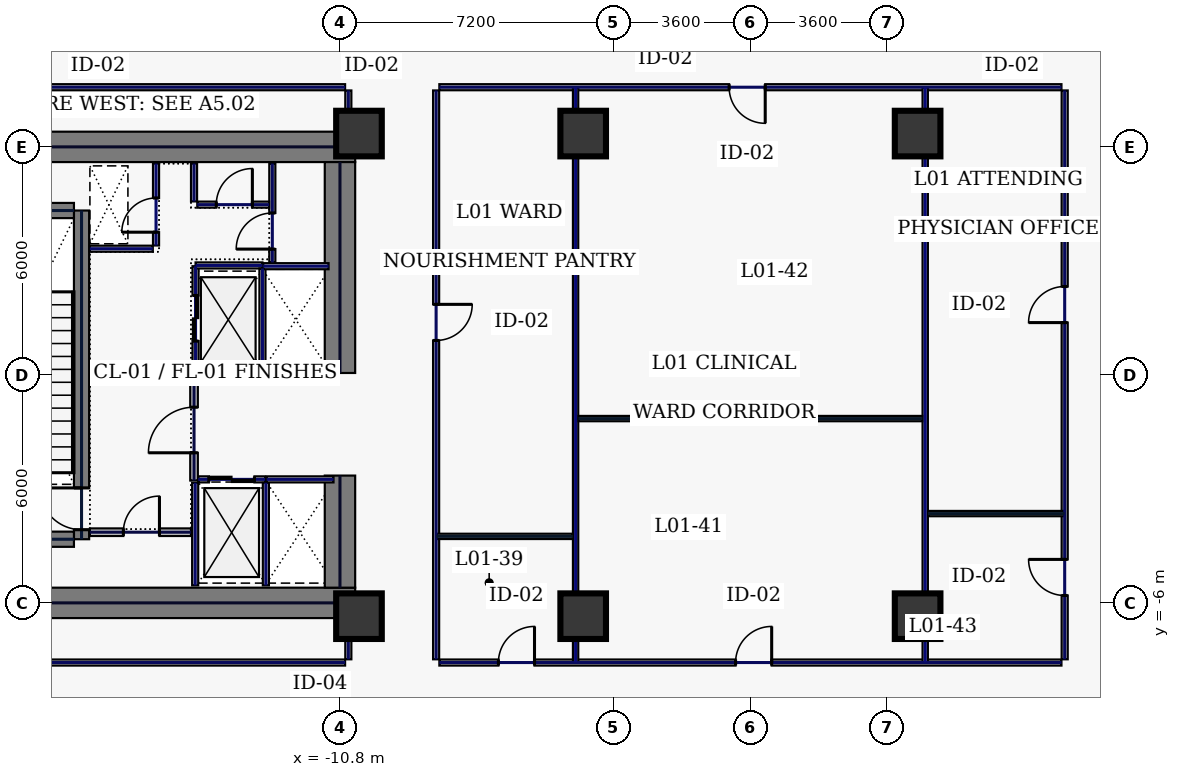
"""IFC4 building model, lengths in metres.
Left out: names, types, materials, properties, quantities, classifications, styles, units other than length and angle.
Written with IfcOpenShell. Run it as: python <this file> out.ifc"""

import sys

from ifc_helpers import new_model, si_unit, direction, frame, frame_2d, origin, origin_2d, place, context, subcontext, project, spatial, rectangle, hollow_rectangle, extrude, element, fill, save


model = new_model("IFC4")
c1 = context("Model", 3, precision=1e-05, world=origin(), true_north=direction((0.0, 1.0)))
c2 = subcontext(c1, "Body", "Model", "MODEL_VIEW")
j1 = project(units=[si_unit("LENGTHUNIT", "METRE"), si_unit("PLANEANGLEUNIT", "RADIAN")], contexts=[c1])
p1 = place(None, origin())
s1 = spatial("IfcSite", under=j1, at=p1, CompositionType="ELEMENT")
p2 = place(p1, origin())
s2 = spatial("IfcBuilding", under=s1, at=p2, CompositionType="ELEMENT")
p3 = place(p2, frame((0.0, 0.0, 8.4)))
s3 = spatial("IfcBuildingStorey", under=s2, at=p3, CompositionType="ELEMENT", Elevation=8.4)
for number, where, z_axis, x_axis in (
    (1, (-22.0, 6.0, 0.0), (0.0, 0.0, 1.0), (1.0, 0.0, 0.0)),
    (2, (-22.0, -6.0, 0.0), (0.0, 0.0, 1.0), (1.0, 0.0, 0.0)),
):
    element("IfcWall", number, at=place(p3, frame(where, z_axis=z_axis, x_axis=x_axis)), inside=s3, PredefinedType="SHEAR", context=c2, shape_type="SweptSolid", body=[
        extrude(rectangle(XDim=11.6, YDim=0.8, at=frame_2d((5.8, 0.0))), origin(), (0.0, 0.0, 1.0), 4.7),
    ])
p4 = place(p3, frame((-10.8, -5.6, 0.0), z_axis=(0.0, 0.0, 1.0), x_axis=(0.0, 1.0, 0.0)))
e3 = element("IfcWall", 3, at=p4, inside=s3, PredefinedType="SHEAR", context=c2, shape_type="SweptSolid", body=[
    extrude(rectangle(XDim=2.95, YDim=0.8, at=frame_2d((1.475, 0.0))), origin(), (0.0, 0.0, 1.0), 4.7),
])
p5 = place(p3, frame((-10.8, 0.05, 0.0), z_axis=(0.0, 0.0, 1.0), x_axis=(0.0, 1.0, 0.0)))
e4 = element("IfcWall", 4, at=p5, inside=s3, PredefinedType="SHEAR", context=c2, shape_type="SweptSolid", body=[
    extrude(rectangle(XDim=5.55, YDim=0.8, at=frame_2d((2.775, 0.0))), origin(), (0.0, 0.0, 1.0), 4.7),
])
p6 = place(p3, frame((-17.6, -4.325, 0.0), z_axis=(0.0, 0.0, 1.0), x_axis=(0.0, 1.0, 0.0)))
e5 = element("IfcWall", 5, at=p6, inside=s3, PredefinedType="SHEAR", context=c2, shape_type="SweptSolid", body=[
    extrude(rectangle(XDim=8.65, YDim=0.4, at=frame_2d((4.325, 0.0))), origin(), (0.0, 0.0, 1.0), 4.7),
])
p7 = place(p6, frame((0.25, 0.0, 0.0)))
e6 = element("IfcOpeningElement", 6, at=p7, cuts=e5, PredefinedType="OPENING", context=c2, shape_type="SweptSolid", body=[
    extrude(rectangle(XDim=1.1, YDim=2.2, at=frame_2d((0.55, 1.1))), frame((0.0, 0.21, 0.0), z_axis=(0.0, -1.0, 0.0), x_axis=(1.0, 0.0, 0.0)), (0.0, 0.0, 1.0), 0.42),
])
for number, where, z_axis, x_axis in (
    (7, (-21.2, -4.325, 0.0), (0.0, 0.0, 1.0), (1.0, 0.0, 0.0)),
    (8, (-21.2, 4.325, 0.0), (0.0, 0.0, 1.0), (1.0, 0.0, 0.0)),
):
    element("IfcWall", number, at=place(p3, frame(where, z_axis=z_axis, x_axis=x_axis)), inside=s3, PredefinedType="SHEAR", context=c2, shape_type="SweptSolid", body=[
        extrude(rectangle(XDim=3.4, YDim=0.4, at=frame_2d((1.7, 0.0))), origin(), (0.0, 0.0, 1.0), 4.7),
    ])
for number, where, z_axis, x_axis in (
    (9, (-10.3, -6.35, 0.0), (0.0, 0.0, 1.0), (1.0, 0.0, 0.0)),
    (10, (-10.3, 6.35, 0.0), (0.0, 0.0, 1.0), (1.0, 0.0, 0.0)),
    (11, (-4.4, -6.35, 0.0), (0.0, 0.0, 1.0), (1.0, 0.0, 0.0)),
    (12, (4.4, -6.35, 0.0), (0.0, 0.0, 1.0), (1.0, 0.0, 0.0)),
    (13, (-4.4, 6.35, 0.0), (0.0, 0.0, 1.0), (1.0, 0.0, 0.0)),
    (14, (4.4, 6.35, 0.0), (0.0, 0.0, 1.0), (1.0, 0.0, 0.0)),
):
    element("IfcColumn", number, at=place(p3, frame(where, z_axis=z_axis, x_axis=x_axis)), inside=s3, PredefinedType="COLUMN", context=c2, shape_type="SweptSolid", body=[
        extrude(hollow_rectangle(XDim=1.2, YDim=1.2, WallThickness=0.05, at=origin_2d()), origin(), (0.0, 0.0, 1.0), 4.7),
    ])
p8 = place(p3, frame((-14.6, 0.12, 0.0), z_axis=(0.0, 0.0, 1.0), x_axis=(0.0, 1.0, 0.0)))
e15 = element("IfcWall", 15, at=p8, inside=s3, PredefinedType="PARTITIONING", context=c2, shape_type="SweptSolid", body=[
    extrude(rectangle(XDim=2.74, YDim=0.16, at=frame_2d((1.37, 0.0))), origin(), (0.0, 0.0, 1.0), 4.7),
])
p9 = place(p8, frame((0.77, 0.0, 0.0)))
e16 = element("IfcOpeningElement", 16, at=p9, cuts=e15, PredefinedType="OPENING", context=c2, shape_type="SweptSolid", body=[
    extrude(rectangle(XDim=1.2, YDim=2.2, at=frame_2d((0.6, 1.1))), frame((0.0, 0.09, 0.0), z_axis=(0.0, -1.0, 0.0), x_axis=(1.0, 0.0, 0.0)), (0.0, 0.0, 1.0), 0.18),
])
for number, where, z_axis, x_axis in (
    (17, (-14.6, 0.1, 0.0), (0.0, 0.0, 1.0), (1.0, 0.0, 0.0)),
    (18, (-14.6, 2.88, 0.0), (0.0, 0.0, 1.0), (1.0, 0.0, 0.0)),
):
    element("IfcWall", number, at=place(p3, frame(where, z_axis=z_axis, x_axis=x_axis)), inside=s3, PredefinedType="PARTITIONING", context=c2, shape_type="SweptSolid", body=[
        extrude(rectangle(XDim=1.76, YDim=0.16, at=frame_2d((0.88, 0.0))), origin(), (0.0, 0.0, 1.0), 4.7),
    ])
p10 = place(p3, frame((-12.84, 0.18, 0.0), z_axis=(0.0, 0.0, 1.0), x_axis=(0.0, 1.0, 0.0)))
e19 = element("IfcWall", 19, at=p10, inside=s3, PredefinedType="PARTITIONING", context=c2, shape_type="SweptSolid", body=[
    extrude(rectangle(XDim=2.62, YDim=0.16, at=frame_2d((1.31, 0.0))), origin(), (0.0, 0.0, 1.0), 4.7),
])
p11 = place(p3, frame((-14.53, -2.75, 0.0), z_axis=(0.0, 0.0, 1.0), x_axis=(1.0, 0.0, 0.0)))
e20 = element("IfcWall", 20, at=p11, inside=s3, PredefinedType="PARTITIONING", context=c2, shape_type="SweptSolid", body=[
    extrude(rectangle(XDim=1.76, YDim=0.16, at=frame_2d((0.88, 0.0))), origin(), (0.0, 0.0, 1.0), 4.7),
])
p12 = place(p11, frame((0.28, 0.0, 0.0)))
e21 = element("IfcOpeningElement", 21, at=p12, cuts=e20, PredefinedType="OPENING", context=c2, shape_type="SweptSolid", body=[
    extrude(rectangle(XDim=1.2, YDim=2.2, at=frame_2d((0.6, 1.1))), frame((0.0, 0.09, 0.0), z_axis=(0.0, -1.0, 0.0), x_axis=(1.0, 0.0, 0.0)), (0.0, 0.0, 1.0), 0.18),
])
for number, where, z_axis, x_axis in (
    (22, (-12.75, -5.54, 0.0), (0.0, 0.0, 1.0), (0.0, 1.0, 0.0)),
    (23, (-14.61, -5.54, 0.0), (0.0, 0.0, 1.0), (0.0, 1.0, 0.0)),
):
    element("IfcWall", number, at=place(p3, frame(where, z_axis=z_axis, x_axis=x_axis)), inside=s3, PredefinedType="PARTITIONING", context=c2, shape_type="SweptSolid", body=[
        extrude(rectangle(XDim=2.7, YDim=0.16, at=frame_2d((1.35, 0.0))), origin(), (0.0, 0.0, 1.0), 4.7),
    ])
p13 = place(p3, frame((-12.73, -2.75, 0.0), z_axis=(0.0, 0.0, 1.0), x_axis=(1.0, 0.0, 0.0)))
e24 = element("IfcWall", 24, at=p13, inside=s3, PredefinedType="PARTITIONING", context=c2, shape_type="SweptSolid", body=[
    extrude(rectangle(XDim=1.76, YDim=0.16, at=frame_2d((0.88, 0.0))), origin(), (0.0, 0.0, 1.0), 4.7),
])
for number, where, z_axis, x_axis in (
    (25, (-12.82, 0.06, 0.0), (0.0, 0.0, 1.0), (1.0, 0.0, 0.0)),
    (26, (-12.82, 2.86, 0.0), (0.0, 0.0, 1.0), (1.0, 0.0, 0.0)),
):
    element("IfcWall", number, at=place(p3, frame(where, z_axis=z_axis, x_axis=x_axis)), inside=s3, PredefinedType="PARTITIONING", context=c2, shape_type="SweptSolid", body=[
        extrude(rectangle(XDim=1.72, YDim=0.16, at=frame_2d((0.86, 0.0))), origin(), (0.0, 0.0, 1.0), 4.7),
    ])
p14 = place(p3, frame((-15.64, 3.405, 0.0), z_axis=(0.0, 0.0, 1.0), x_axis=(0.0, 1.0, 0.0)))
e27 = element("IfcWall", 27, at=p14, inside=s3, PredefinedType="PARTITIONING", context=c2, shape_type="SweptSolid", body=[
    extrude(rectangle(XDim=2.155, YDim=0.16, at=frame_2d((1.078, 0.0))), origin(), (0.0, 0.0, 1.0), 4.7),
])
p15 = place(p14, frame((0.35, 0.0, 0.0)))
e28 = element("IfcOpeningElement", 28, at=p15, cuts=e27, PredefinedType="OPENING", context=c2, shape_type="SweptSolid", body=[
    extrude(rectangle(XDim=0.9, YDim=2.2, at=frame_2d((0.45, 1.1))), frame((0.0, 0.09, 0.0), z_axis=(0.0, -1.0, 0.0), x_axis=(1.0, 0.0, 0.0)), (0.0, 0.0, 1.0), 0.18),
])
p16 = place(p3, frame((-17.38, 3.32, 0.0), z_axis=(0.0, 0.0, 1.0), x_axis=(1.0, 0.0, 0.0)))
e29 = element("IfcWall", 29, at=p16, inside=s3, PredefinedType="PARTITIONING", context=c2, shape_type="SweptSolid", body=[
    extrude(rectangle(XDim=1.655, YDim=0.16, at=frame_2d((0.827, 0.0))), origin(), (0.0, 0.0, 1.0), 4.7),
])
p17 = place(p3, frame((-17.38, -4.14, 0.0), z_axis=(0.0, 0.0, 1.0), x_axis=(1.0, 0.0, 0.0)))
e30 = element("IfcWall", 30, at=p17, inside=s3, PredefinedType="SOLIDWALL", context=c2, shape_type="SweptSolid", body=[
    extrude(rectangle(XDim=2.66, YDim=0.2, at=frame_2d((1.33, 0.0))), origin(), (0.0, 0.0, 1.0), 4.7),
])
p18 = place(p17, frame((0.88, 0.0, 0.0)))
e31 = element("IfcOpeningElement", 31, at=p18, cuts=e30, PredefinedType="OPENING", context=c2, shape_type="SweptSolid", body=[
    extrude(rectangle(XDim=0.95, YDim=2.2, at=frame_2d((0.475, 1.1))), frame((0.0, 0.11, 0.0), z_axis=(0.0, -1.0, 0.0), x_axis=(1.0, 0.0, 0.0)), (0.0, 0.0, 1.0), 0.22),
])
p19 = place(p3, frame((-12.58, 2.96, 0.0), z_axis=(0.0, 0.0, 1.0), x_axis=(0.0, 1.0, 0.0)))
e32 = element("IfcWall", 32, at=p19, inside=s3, PredefinedType="PARTITIONING", context=c2, shape_type="SweptSolid", body=[
    extrude(rectangle(XDim=2.6, YDim=0.16, at=frame_2d((1.3, 0.0))), origin(), (0.0, 0.0, 1.0), 4.7),
])
p20 = place(p19, frame((0.35, 0.0, 0.0)))
e33 = element("IfcOpeningElement", 33, at=p20, cuts=e32, PredefinedType="OPENING", context=c2, shape_type="SweptSolid", body=[
    extrude(rectangle(XDim=0.95, YDim=2.2, at=frame_2d((0.475, 1.1))), frame((0.0, 0.09, 0.0), z_axis=(0.0, -1.0, 0.0), x_axis=(1.0, 0.0, 0.0)), (0.0, 0.0, 1.0), 0.18),
])
p21 = place(p3, frame((-14.555, 4.48, 0.0), z_axis=(0.0, 0.0, 1.0), x_axis=(1.0, 0.0, 0.0)))
e34 = element("IfcWall", 34, at=p21, inside=s3, PredefinedType="PARTITIONING", context=c2, shape_type="SweptSolid", body=[
    extrude(rectangle(XDim=1.89, YDim=0.16, at=frame_2d((0.945, 0.0))), origin(), (0.0, 0.0, 1.0), 4.7),
])
p22 = place(p21, frame((0.5, 0.0, 0.0)))
e35 = element("IfcOpeningElement", 35, at=p22, cuts=e34, PredefinedType="OPENING", context=c2, shape_type="SweptSolid", body=[
    extrude(rectangle(XDim=0.95, YDim=2.2, at=frame_2d((0.475, 1.1))), frame((0.0, 0.09, 0.0), z_axis=(0.0, -1.0, 0.0), x_axis=(1.0, 0.0, 0.0)), (0.0, 0.0, 1.0), 0.18),
])
p23 = place(p3, frame((-14.64, 4.565, 0.0), z_axis=(0.0, 0.0, 1.0), x_axis=(0.0, 1.0, 0.0)))
e36 = element("IfcWall", 36, at=p23, inside=s3, PredefinedType="PARTITIONING", context=c2, shape_type="SweptSolid", body=[
    extrude(rectangle(XDim=0.995, YDim=0.16, at=frame_2d((0.498, 0.0))), origin(), (0.0, 0.0, 1.0), 4.7),
])
p24 = place(p3, frame((-14.64, -2.78, 0.0), z_axis=(0.0, 0.0, 1.0), x_axis=(0.0, 1.0, 0.0)))
e37 = element("IfcWall", 37, at=p24, inside=s3, PredefinedType="SOLIDWALL", context=c2, shape_type="SweptSolid", body=[
    extrude(rectangle(XDim=2.82, YDim=0.2, at=frame_2d((1.41, 0.0))), origin(), (0.0, 0.0, 1.0), 4.7),
])
p25 = place(p24, frame((0.73, 0.0, 0.0)))
e38 = element("IfcOpeningElement", 38, at=p25, cuts=e37, PredefinedType="OPENING", context=c2, shape_type="SweptSolid", body=[
    extrude(rectangle(XDim=1.2, YDim=2.2, at=frame_2d((0.6, 1.1))), frame((0.0, 0.11, 0.0), z_axis=(0.0, -1.0, 0.0), x_axis=(1.0, 0.0, 0.0)), (0.0, 0.0, 1.0), 0.22),
])
p26 = place(p3, frame((8.185, 7.57, 0.0), z_axis=(0.0, 0.0, 1.0), x_axis=(-1.0, 0.0, 0.0)))
e39 = element("IfcWall", 39, at=p26, inside=s3, PredefinedType="PARTITIONING", context=c2, shape_type="SweptSolid", body=[
    extrude(rectangle(XDim=16.37, YDim=0.16, at=frame_2d((8.185, 0.0))), origin(), (0.0, 0.0, 1.0), 4.7),
])
p27 = place(p26, frame((7.795, 0.0, 0.0)))
e40 = element("IfcOpeningElement", 40, at=p27, cuts=e39, PredefinedType="OPENING", context=c2, shape_type="SweptSolid", body=[
    extrude(rectangle(XDim=0.95, YDim=2.2, at=frame_2d((0.475, 1.1))), frame((0.0, 0.09, 0.0), z_axis=(0.0, -1.0, 0.0), x_axis=(1.0, 0.0, 0.0)), (0.0, 0.0, 1.0), 0.18),
])
p28 = place(p3, frame((-8.27, 7.485, 0.0), z_axis=(0.0, 0.0, 1.0), x_axis=(0.0, -1.0, 0.0)))
e41 = element("IfcWall", 41, at=p28, inside=s3, PredefinedType="PARTITIONING", context=c2, shape_type="SweptSolid", body=[
    extrude(rectangle(XDim=14.97, YDim=0.16, at=frame_2d((7.485, 0.0))), origin(), (0.0, 0.0, 1.0), 4.7),
])
p29 = place(p28, frame((5.629, 0.0, 0.0)))
e42 = element("IfcOpeningElement", 42, at=p29, cuts=e41, PredefinedType="OPENING", context=c2, shape_type="SweptSolid", body=[
    extrude(rectangle(XDim=0.95, YDim=2.2, at=frame_2d((0.475, 1.1))), frame((0.0, 0.09, 0.0), z_axis=(0.0, -1.0, 0.0), x_axis=(1.0, 0.0, 0.0)), (0.0, 0.0, 1.0), 0.18),
])
p30 = place(p3, frame((-8.185, -7.57, 0.0), z_axis=(0.0, 0.0, 1.0), x_axis=(1.0, 0.0, 0.0)))
e43 = element("IfcWall", 43, at=p30, inside=s3, PredefinedType="PARTITIONING", context=c2, shape_type="SweptSolid", body=[
    extrude(rectangle(XDim=16.37, YDim=0.16, at=frame_2d((8.185, 0.0))), origin(), (0.0, 0.0, 1.0), 4.7),
])
p31 = place(p30, frame((1.554, 0.0, 0.0)))
e44 = element("IfcOpeningElement", 44, at=p31, cuts=e43, PredefinedType="OPENING", context=c2, shape_type="SweptSolid", body=[
    extrude(rectangle(XDim=0.95, YDim=2.2, at=frame_2d((0.475, 1.1))), frame((0.0, 0.09, 0.0), z_axis=(0.0, -1.0, 0.0), x_axis=(1.0, 0.0, 0.0)), (0.0, 0.0, 1.0), 0.18),
])
p32 = place(p30, frame((7.795, 0.0, 0.0)))
e45 = element("IfcOpeningElement", 45, at=p32, cuts=e43, PredefinedType="OPENING", context=c2, shape_type="SweptSolid", body=[
    extrude(rectangle(XDim=0.95, YDim=2.2, at=frame_2d((0.475, 1.1))), frame((0.0, 0.09, 0.0), z_axis=(0.0, -1.0, 0.0), x_axis=(1.0, 0.0, 0.0)), (0.0, 0.0, 1.0), 0.18),
])
p33 = place(p3, frame((8.27, -7.485, 0.0), z_axis=(0.0, 0.0, 1.0), x_axis=(0.0, 1.0, 0.0)))
e46 = element("IfcWall", 46, at=p33, inside=s3, PredefinedType="PARTITIONING", context=c2, shape_type="SweptSolid", body=[
    extrude(rectangle(XDim=14.97, YDim=0.16, at=frame_2d((7.485, 0.0))), origin(), (0.0, 0.0, 1.0), 4.7),
])
p34 = place(p33, frame((1.679, 0.0, 0.0)))
e47 = element("IfcOpeningElement", 47, at=p34, cuts=e46, PredefinedType="OPENING", context=c2, shape_type="SweptSolid", body=[
    extrude(rectangle(XDim=0.95, YDim=2.2, at=frame_2d((0.475, 1.1))), frame((0.0, 0.09, 0.0), z_axis=(0.0, -1.0, 0.0), x_axis=(1.0, 0.0, 0.0)), (0.0, 0.0, 1.0), 0.18),
])
p35 = place(p33, frame((8.861, 0.0, 0.0)))
e48 = element("IfcOpeningElement", 48, at=p35, cuts=e46, PredefinedType="OPENING", context=c2, shape_type="SweptSolid", body=[
    extrude(rectangle(XDim=0.95, YDim=2.2, at=frame_2d((0.475, 1.1))), frame((0.0, 0.09, 0.0), z_axis=(0.0, -1.0, 0.0), x_axis=(1.0, 0.0, 0.0)), (0.0, 0.0, 1.0), 0.18),
])
for number, where, z_axis, x_axis in (
    (49, (-10.58, -7.485, 0.0), (0.0, 0.0, 1.0), (0.0, 1.0, 0.0)),
    (50, (-10.58, 6.42, 0.0), (0.0, 0.0, 1.0), (0.0, 1.0, 0.0)),
):
    element("IfcWall", number, at=place(p3, frame(where, z_axis=z_axis, x_axis=x_axis)), inside=s3, PredefinedType="PARTITIONING", context=c2, shape_type="SweptSolid", body=[
        extrude(rectangle(XDim=1.065, YDim=0.16, at=frame_2d((0.533, 0.0))), origin(), (0.0, 0.0, 1.0), 4.7),
    ])
for number, where, z_axis, x_axis in (
    (51, (-10.665, 7.57, 0.0), (0.0, 0.0, 1.0), (-1.0, 0.0, 0.0)),
    (52, (-27.185, -7.57, 0.0), (0.0, 0.0, 1.0), (1.0, 0.0, 0.0)),
):
    element("IfcWall", number, at=place(p3, frame(where, z_axis=z_axis, x_axis=x_axis)), inside=s3, PredefinedType="PARTITIONING", context=c2, shape_type="SweptSolid", body=[
        extrude(rectangle(XDim=16.52, YDim=0.16, at=frame_2d((8.26, 0.0))), origin(), (0.0, 0.0, 1.0), 4.7),
    ])
for number, where, z_axis, x_axis in (
    (53, (-4.6, -7.565, 0.0), (0.0, 0.0, 1.0), (0.0, 1.0, 0.0)),
    (54, (4.6, -7.565, 0.0), (0.0, 0.0, 1.0), (0.0, 1.0, 0.0)),
):
    element("IfcWall", number, at=place(p3, frame(where, z_axis=z_axis, x_axis=x_axis)), inside=s3, PredefinedType="PARTITIONING", context=c2, shape_type="SweptSolid", body=[
        extrude(rectangle(XDim=15.13, YDim=0.14, at=frame_2d((7.565, 0.0))), origin(), (0.0, 0.0, 1.0), 3.695),
    ])
p36 = place(p3, frame((-4.525, -1.15, 0.0), z_axis=(0.0, 0.0, 1.0), x_axis=(1.0, 0.0, 0.0)))
e55 = element("IfcWall", 55, at=p36, inside=s3, PredefinedType="PARTITIONING", context=c2, shape_type="SweptSolid", body=[
    extrude(rectangle(XDim=9.05, YDim=0.14, at=frame_2d((4.525, 0.0))), origin(), (0.0, 0.0, 1.0), 4.7),
])
for number, where, z_axis, x_axis in (
    (56, (-8.265, -4.25, 0.0), (0.0, 0.0, 1.0), (1.0, 0.0, 0.0)),
    (57, (4.675, -3.65, 0.0), (0.0, 0.0, 1.0), (1.0, 0.0, 0.0)),
):
    element("IfcWall", number, at=place(p3, frame(where, z_axis=z_axis, x_axis=x_axis)), inside=s3, PredefinedType="PARTITIONING", context=c2, shape_type="SweptSolid", body=[
        extrude(rectangle(XDim=3.59, YDim=0.14, at=frame_2d((1.795, 0.0))), origin(), (0.0, 0.0, 1.0), 4.7),
    ])
p37 = place(p7, origin())
e58 = element("IfcDoor", 58, at=p37, inside=s3, OperationType="SINGLE_SWING_RIGHT", PredefinedType="DOOR", context=c2, shape_type="SweptSolid", body=[
    extrude(rectangle(XDim=1.1, YDim=2.2, at=frame_2d((0.55, 1.1))), frame((0.0, 0.025, 0.0), z_axis=(0.0, -1.0, 0.0), x_axis=(1.0, 0.0, 0.0)), (0.0, 0.0, 1.0), 0.05),
])
fill(e6, e58)
p38 = place(p9, origin())
e59 = element("IfcDoor", 59, at=p38, inside=s3, OperationType="SLIDING_TO_LEFT", PredefinedType="DOOR", context=c2, shape_type="SweptSolid", body=[
    extrude(rectangle(XDim=1.2, YDim=2.2, at=frame_2d((0.6, 1.1))), frame((0.0, 0.025, 0.0), z_axis=(0.0, -1.0, 0.0), x_axis=(1.0, 0.0, 0.0)), (0.0, 0.0, 1.0), 0.05),
])
fill(e16, e59)
p39 = place(p12, origin())
e60 = element("IfcDoor", 60, at=p39, inside=s3, OperationType="SLIDING_TO_LEFT", PredefinedType="DOOR", context=c2, shape_type="SweptSolid", body=[
    extrude(rectangle(XDim=1.2, YDim=2.2, at=frame_2d((0.6, 1.1))), frame((0.0, 0.025, 0.0), z_axis=(0.0, -1.0, 0.0), x_axis=(1.0, 0.0, 0.0)), (0.0, 0.0, 1.0), 0.05),
])
fill(e21, e60)
p40 = place(p15, origin())
e61 = element("IfcDoor", 61, at=p40, inside=s3, OperationType="SINGLE_SWING_LEFT", PredefinedType="DOOR", context=c2, shape_type="SweptSolid", body=[
    extrude(rectangle(XDim=0.9, YDim=2.2, at=frame_2d((0.45, 1.1))), frame((0.0, 0.025, 0.0), z_axis=(0.0, -1.0, 0.0), x_axis=(1.0, 0.0, 0.0)), (0.0, 0.0, 1.0), 0.05),
])
fill(e28, e61)
p41 = place(p18, origin())
e62 = element("IfcDoor", 62, at=p41, inside=s3, OperationType="SINGLE_SWING_RIGHT", PredefinedType="DOOR", context=c2, shape_type="SweptSolid", body=[
    extrude(rectangle(XDim=0.95, YDim=2.2, at=frame_2d((0.475, 1.1))), frame((0.0, 0.025, 0.0), z_axis=(0.0, -1.0, 0.0), x_axis=(1.0, 0.0, 0.0)), (0.0, 0.0, 1.0), 0.05),
])
fill(e31, e62)
p42 = place(p20, origin())
e63 = element("IfcDoor", 63, at=p42, inside=s3, OperationType="SINGLE_SWING_LEFT", PredefinedType="DOOR", context=c2, shape_type="SweptSolid", body=[
    extrude(rectangle(XDim=0.95, YDim=2.2, at=frame_2d((0.475, 1.1))), frame((0.0, 0.025, 0.0), z_axis=(0.0, -1.0, 0.0), x_axis=(1.0, 0.0, 0.0)), (0.0, 0.0, 1.0), 0.05),
])
fill(e33, e63)
p43 = place(p22, origin())
e64 = element("IfcDoor", 64, at=p43, inside=s3, OperationType="SINGLE_SWING_RIGHT", PredefinedType="DOOR", context=c2, shape_type="SweptSolid", body=[
    extrude(rectangle(XDim=0.95, YDim=2.2, at=frame_2d((0.475, 1.1))), frame((0.0, 0.025, 0.0), z_axis=(0.0, -1.0, 0.0), x_axis=(1.0, 0.0, 0.0)), (0.0, 0.0, 1.0), 0.05),
])
fill(e35, e64)
p44 = place(p25, origin())
e65 = element("IfcDoor", 65, at=p44, inside=s3, OperationType="SINGLE_SWING_LEFT", PredefinedType="DOOR", context=c2, shape_type="SweptSolid", body=[
    extrude(rectangle(XDim=1.2, YDim=2.2, at=frame_2d((0.6, 1.1))), frame((0.0, 0.025, 0.0), z_axis=(0.0, -1.0, 0.0), x_axis=(1.0, 0.0, 0.0)), (0.0, 0.0, 1.0), 0.05),
])
fill(e38, e65)
p45 = place(p31, origin())
e66 = element("IfcDoor", 66, at=p45, inside=s3, OperationType="SINGLE_SWING_RIGHT", PredefinedType="DOOR", context=c2, shape_type="SweptSolid", body=[
    extrude(rectangle(XDim=0.95, YDim=2.2, at=frame_2d((0.475, 1.1))), frame((0.0, 0.025, 0.0), z_axis=(0.0, -1.0, 0.0), x_axis=(1.0, 0.0, 0.0)), (0.0, 0.0, 1.0), 0.05),
])
fill(e44, e66)
p46 = place(p29, origin())
e67 = element("IfcDoor", 67, at=p46, inside=s3, OperationType="SINGLE_SWING_LEFT", PredefinedType="DOOR", context=c2, shape_type="SweptSolid", body=[
    extrude(rectangle(XDim=0.95, YDim=2.2, at=frame_2d((0.475, 1.1))), frame((0.0, 0.025, 0.0), z_axis=(0.0, -1.0, 0.0), x_axis=(1.0, 0.0, 0.0)), (0.0, 0.0, 1.0), 0.05),
])
fill(e42, e67)
p47 = place(p32, origin())
e68 = element("IfcDoor", 68, at=p47, inside=s3, OperationType="SINGLE_SWING_RIGHT", PredefinedType="DOOR", context=c2, shape_type="SweptSolid", body=[
    extrude(rectangle(XDim=0.95, YDim=2.2, at=frame_2d((0.475, 1.1))), frame((0.0, 0.025, 0.0), z_axis=(0.0, -1.0, 0.0), x_axis=(1.0, 0.0, 0.0)), (0.0, 0.0, 1.0), 0.05),
])
fill(e45, e68)
p48 = place(p27, origin())
e69 = element("IfcDoor", 69, at=p48, inside=s3, OperationType="SINGLE_SWING_LEFT", PredefinedType="DOOR", context=c2, shape_type="SweptSolid", body=[
    extrude(rectangle(XDim=0.95, YDim=2.2, at=frame_2d((0.475, 1.1))), frame((0.0, 0.025, 0.0), z_axis=(0.0, -1.0, 0.0), x_axis=(1.0, 0.0, 0.0)), (0.0, 0.0, 1.0), 0.05),
])
fill(e40, e69)
p49 = place(p34, origin())
e70 = element("IfcDoor", 70, at=p49, inside=s3, OperationType="SINGLE_SWING_RIGHT", PredefinedType="DOOR", context=c2, shape_type="SweptSolid", body=[
    extrude(rectangle(XDim=0.95, YDim=2.2, at=frame_2d((0.475, 1.1))), frame((0.0, 0.025, 0.0), z_axis=(0.0, -1.0, 0.0), x_axis=(1.0, 0.0, 0.0)), (0.0, 0.0, 1.0), 0.05),
])
fill(e47, e70)
p50 = place(p35, origin())
e71 = element("IfcDoor", 71, at=p50, inside=s3, OperationType="SINGLE_SWING_LEFT", PredefinedType="DOOR", context=c2, shape_type="SweptSolid", body=[
    extrude(rectangle(XDim=0.95, YDim=2.2, at=frame_2d((0.475, 1.1))), frame((0.0, 0.025, 0.0), z_axis=(0.0, -1.0, 0.0), x_axis=(1.0, 0.0, 0.0)), (0.0, 0.0, 1.0), 0.05),
])
fill(e48, e71)
save(model, sys.argv[1])
